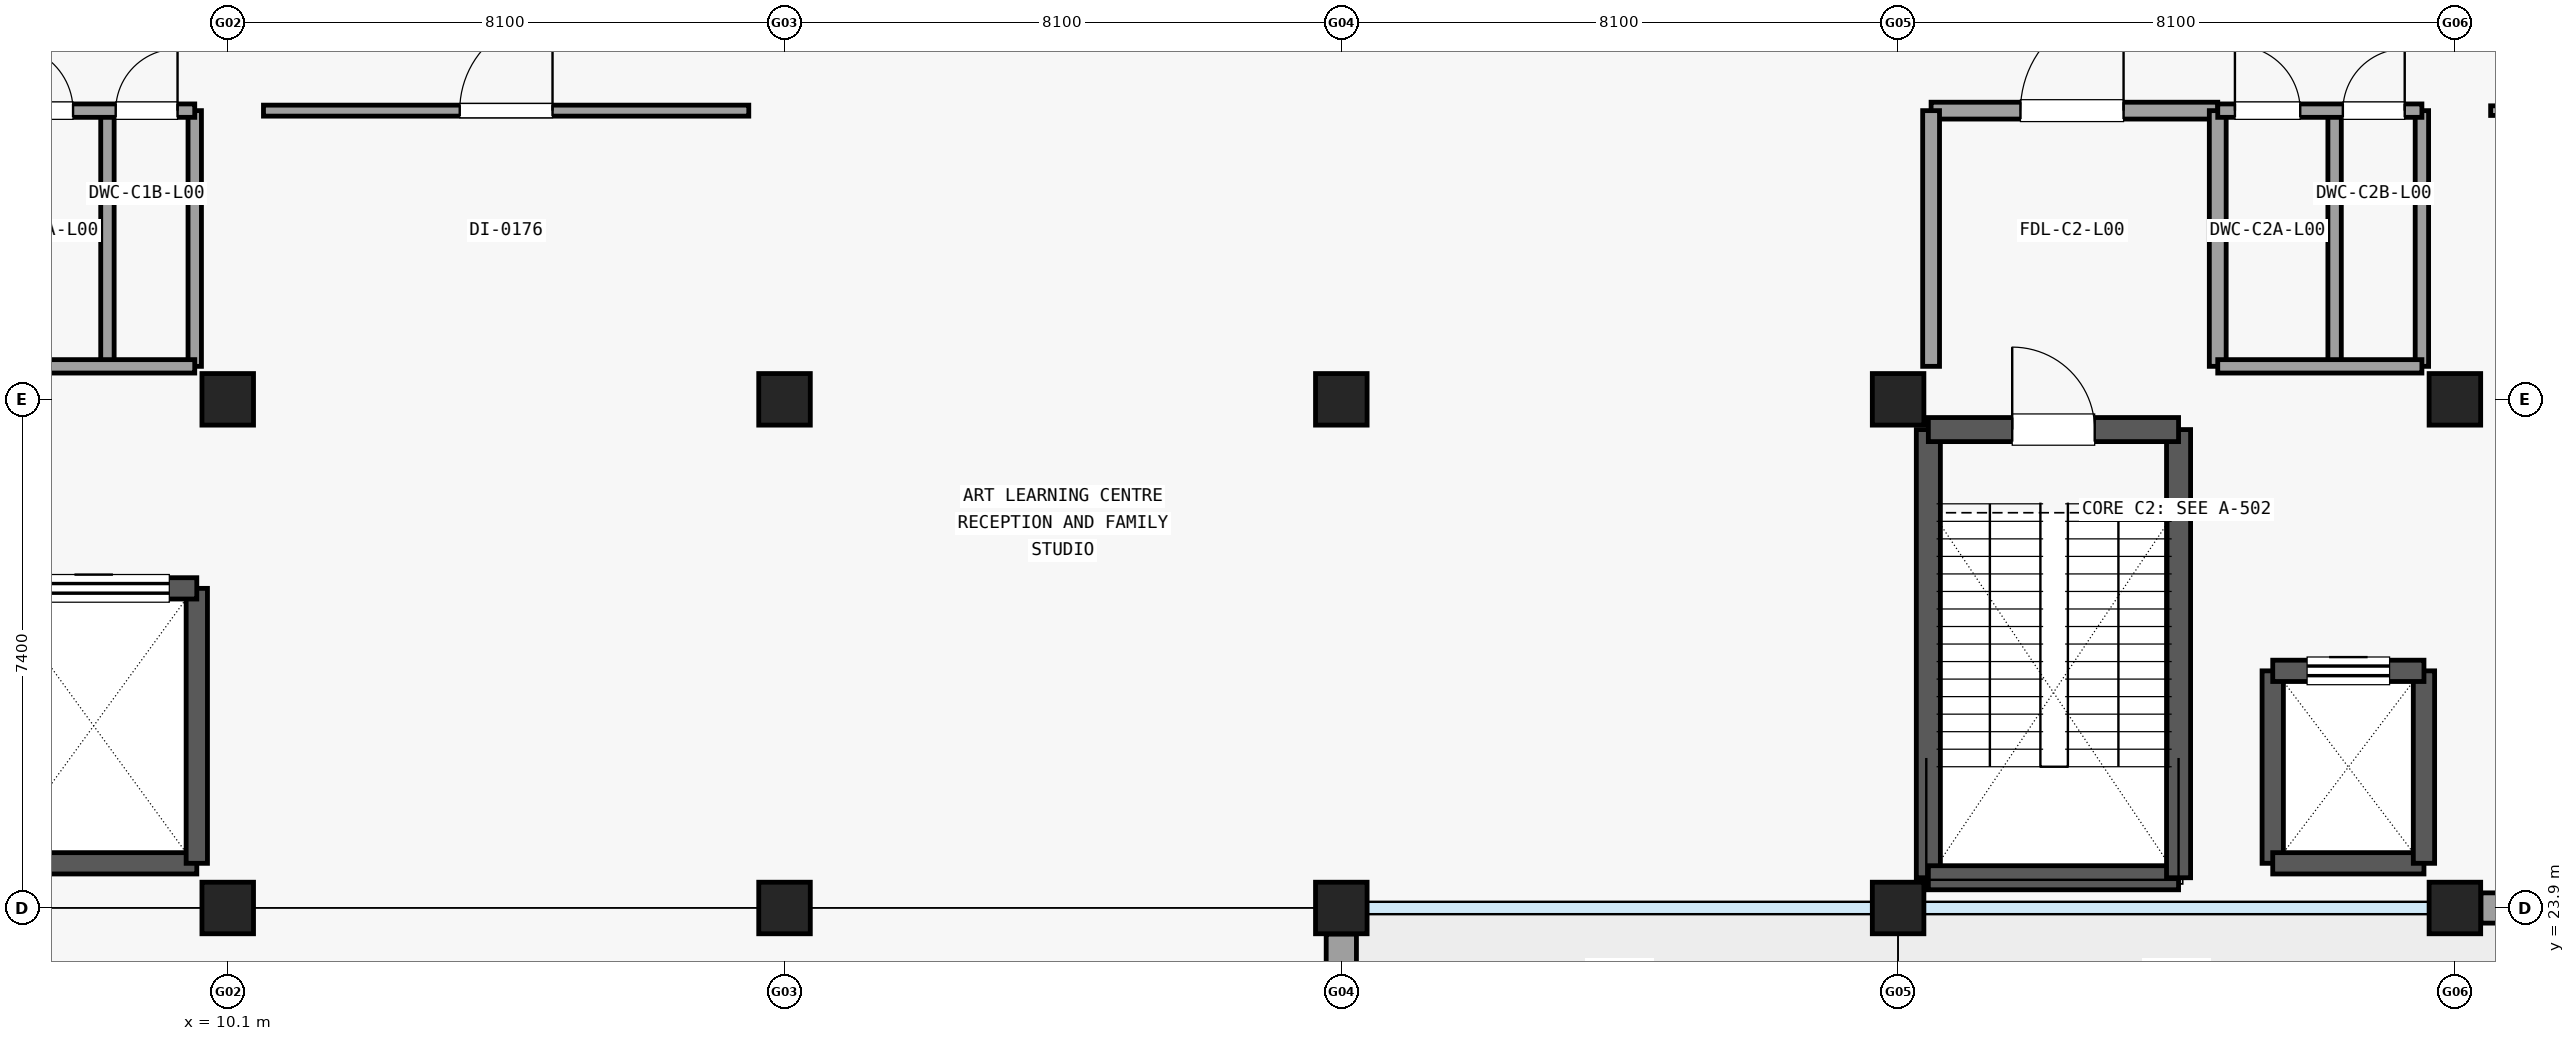
"""IFC4 building model, lengths in metres.
Left out: names, types, materials, properties, quantities, classifications, styles, units other than length and angle.
Written with IfcOpenShell. Run it as: python <this file> out.ifc"""

import sys

from ifc_helpers import new_model, si_unit, direction, frame, frame_2d, origin, origin_2d, place, context, subcontext, project, spatial, rectangle, extrude, element, fill, save


model = new_model("IFC4")
c1 = context("Model", 3, precision=1e-05, world=origin(), true_north=direction((0.0, 1.0)))
c2 = subcontext(c1, "Body", "Model", "MODEL_VIEW")
j1 = project(units=[si_unit("LENGTHUNIT", "METRE"), si_unit("PLANEANGLEUNIT", "RADIAN")], contexts=[c1])
p1 = place(None, origin())
s1 = spatial("IfcSite", under=j1, at=p1, CompositionType="ELEMENT")
p2 = place(p1, origin())
s2 = spatial("IfcBuilding", under=s1, at=p2, CompositionType="ELEMENT")
p3 = place(p2, origin())
s3 = spatial("IfcBuildingStorey", under=s2, at=p3, CompositionType="ELEMENT", Elevation=0.0)
for number, where, z_axis, x_axis in (
    (1, (10.1, 23.9, 0.0), (0.0, 0.0, 1.0), (1.0, 0.0, 0.0)),
    (2, (10.1, 31.3, 0.0), (0.0, 0.0, 1.0), (1.0, 0.0, 0.0)),
    (3, (18.2, 23.9, 0.0), (0.0, 0.0, 1.0), (1.0, 0.0, 0.0)),
    (4, (18.2, 31.3, 0.0), (0.0, 0.0, 1.0), (1.0, 0.0, 0.0)),
    (5, (26.3, 23.9, 0.0), (0.0, 0.0, 1.0), (1.0, 0.0, 0.0)),
    (6, (26.3, 31.3, 0.0), (0.0, 0.0, 1.0), (1.0, 0.0, 0.0)),
    (7, (34.4, 23.9, 0.0), (0.0, 0.0, 1.0), (1.0, 0.0, 0.0)),
    (8, (34.4, 31.3, 0.0), (0.0, 0.0, 1.0), (1.0, 0.0, 0.0)),
    (9, (42.5, 23.9, 0.0), (0.0, 0.0, 1.0), (1.0, 0.0, 0.0)),
    (10, (42.5, 31.3, 0.0), (0.0, 0.0, 1.0), (1.0, 0.0, 0.0)),
):
    element("IfcColumn", number, at=place(p3, frame(where, z_axis=z_axis, x_axis=x_axis)), inside=s3, PredefinedType="COLUMN", context=c2, shape_type="SweptSolid", body=[
        extrude(rectangle(XDim=0.75, YDim=0.75, at=origin_2d()), origin(), (0.0, 0.0, 1.0), 5.135),
    ])
p4 = place(p3, frame((26.3, 23.521, 0.0), z_axis=(0.0, 0.0, 1.0), x_axis=(0.0, -1.0, 0.0)))
e11 = element("IfcWall", 11, at=p4, inside=s3, PredefinedType="SOLIDWALL", context=c2, shape_type="SweptSolid", body=[
    extrude(rectangle(XDim=6.642, YDim=0.44, at=frame_2d((3.321, 0.0))), origin(), (0.0, 0.0, 1.0), 4.27),
])
p5 = place(p4, frame((2.331, 0.0, 0.65)))
e12 = element("IfcOpeningElement", 12, at=p5, cuts=e11, PredefinedType="OPENING", context=c2, shape_type="SweptSolid", body=[
    extrude(rectangle(XDim=0.75, YDim=3.1, at=frame_2d((0.375, 1.55))), frame((0.0, 0.23, 0.0), z_axis=(0.0, -1.0, 0.0), x_axis=(1.0, 0.0, 0.0)), (0.0, 0.0, 1.0), 0.46),
])
p6 = place(p4, frame((3.561, 0.0, 0.65)))
e13 = element("IfcOpeningElement", 13, at=p6, cuts=e11, PredefinedType="OPENING", context=c2, shape_type="SweptSolid", body=[
    extrude(rectangle(XDim=0.75, YDim=3.1, at=frame_2d((0.375, 1.55))), frame((0.0, 0.23, 0.0), z_axis=(0.0, -1.0, 0.0), x_axis=(1.0, 0.0, 0.0)), (0.0, 0.0, 1.0), 0.46),
])
p7 = place(p3, frame((50.221, 23.9, 0.0), z_axis=(0.0, 0.0, 1.0), x_axis=(-1.0, 0.0, 0.0)))
e14 = element("IfcWall", 14, at=p7, inside=s3, PredefinedType="SOLIDWALL", context=c2, shape_type="SweptSolid", body=[
    extrude(rectangle(XDim=7.342, YDim=0.44, at=frame_2d((3.671, 0.0))), origin(), (0.0, 0.0, 1.0), 4.27),
])
p8 = place(p7, frame((2.646, 0.0, 0.0)))
e15 = element("IfcOpeningElement", 15, at=p8, cuts=e14, PredefinedType="OPENING", context=c2, shape_type="SweptSolid", body=[
    extrude(rectangle(XDim=2.05, YDim=2.35, at=frame_2d((1.025, 1.175))), frame((0.0, 0.23, 0.0), z_axis=(0.0, -1.0, 0.0), x_axis=(1.0, 0.0, 0.0)), (0.0, 0.0, 1.0), 0.46),
])
p9 = place(p3, frame((6.65, 24.55, 0.0), z_axis=(0.0, 0.0, 1.0), x_axis=(1.0, 0.0, 0.0)))
e16 = element("IfcWall", 16, at=p9, inside=s3, PredefinedType="SHEAR", context=c2, shape_type="SweptSolid", body=[
    extrude(rectangle(XDim=3.0, YDim=0.31, at=frame_2d((1.5, 0.0))), origin(), (0.0, 0.0, 1.0), 5.13),
])
p10 = place(p3, frame((9.65, 24.55, 0.0), z_axis=(0.0, 0.0, 1.0), x_axis=(0.0, 1.0, 0.0)))
e17 = element("IfcWall", 17, at=p10, inside=s3, PredefinedType="SHEAR", context=c2, shape_type="SweptSolid", body=[
    extrude(rectangle(XDim=4.0, YDim=0.31, at=frame_2d((2.0, 0.0))), origin(), (0.0, 0.0, 1.0), 5.13),
])
p11 = place(p3, frame((6.65, 28.55, 0.0), z_axis=(0.0, 0.0, 1.0), x_axis=(1.0, 0.0, 0.0)))
e18 = element("IfcWall", 18, at=p11, inside=s3, PredefinedType="SHEAR", context=c2, shape_type="SweptSolid", body=[
    extrude(rectangle(XDim=3.0, YDim=0.31, at=frame_2d((1.5, 0.0))), origin(), (0.0, 0.0, 1.0), 5.13),
])
p12 = place(p11, frame((0.4, 0.0, 0.0)))
e19 = element("IfcOpeningElement", 19, at=p12, cuts=e18, PredefinedType="OPENING", context=c2, shape_type="SweptSolid", body=[
    extrude(rectangle(XDim=2.2, YDim=2.55, at=frame_2d((1.1, 1.275))), frame((0.0, 0.165, 0.0), z_axis=(0.0, -1.0, 0.0), x_axis=(1.0, 0.0, 0.0)), (0.0, 0.0, 1.0), 0.33),
])
for number, where, z_axis, x_axis in (
    (20, (8.35, 31.78, 0.0), (0.0, 0.0, 1.0), (0.0, 1.0, 0.0)),
    (21, (9.62, 31.78, 0.0), (0.0, 0.0, 1.0), (0.0, 1.0, 0.0)),
):
    element("IfcWall", number, at=place(p3, frame(where, z_axis=z_axis, x_axis=x_axis)), inside=s3, PredefinedType="PARTITIONING", context=c2, shape_type="SweptSolid", body=[
        extrude(rectangle(XDim=3.72, YDim=0.195, at=frame_2d((1.86, 0.0))), origin(), (0.0, 0.0, 1.0), 4.275),
    ])
p13 = place(p3, frame((6.65, 31.78, 0.0), z_axis=(0.0, 0.0, 1.0), x_axis=(1.0, 0.0, 0.0)))
e22 = element("IfcWall", 22, at=p13, inside=s3, PredefinedType="PARTITIONING", context=c2, shape_type="SweptSolid", body=[
    extrude(rectangle(XDim=2.97, YDim=0.195, at=frame_2d((1.485, 0.0))), origin(), (0.0, 0.0, 1.0), 4.275),
])
p14 = place(p3, frame((6.65, 35.5, 0.0), z_axis=(0.0, 0.0, 1.0), x_axis=(1.0, 0.0, 0.0)))
e23 = element("IfcWall", 23, at=p14, inside=s3, PredefinedType="PARTITIONING", context=c2, shape_type="SweptSolid", body=[
    extrude(rectangle(XDim=2.97, YDim=0.195, at=frame_2d((1.485, 0.0))), origin(), (0.0, 0.0, 1.0), 4.275),
])
p15 = place(p14, frame((0.25, 0.0, 0.0)))
e24 = element("IfcOpeningElement", 24, at=p15, cuts=e23, PredefinedType="OPENING", context=c2, shape_type="SweptSolid", body=[
    extrude(rectangle(XDim=0.95, YDim=2.1, at=frame_2d((0.475, 1.05))), frame((0.0, 0.107, 0.0), z_axis=(0.0, -1.0, 0.0), x_axis=(1.0, 0.0, 0.0)), (0.0, 0.0, 1.0), 0.215),
])
p16 = place(p14, frame((1.82, 0.0, 0.0)))
e25 = element("IfcOpeningElement", 25, at=p16, cuts=e23, PredefinedType="OPENING", context=c2, shape_type="SweptSolid", body=[
    extrude(rectangle(XDim=0.9, YDim=2.1, at=frame_2d((0.45, 1.05))), frame((0.0, 0.107, 0.0), z_axis=(0.0, -1.0, 0.0), x_axis=(1.0, 0.0, 0.0)), (0.0, 0.0, 1.0), 0.215),
])
p17 = place(p3, frame((34.84, 24.34, 0.0), z_axis=(0.0, 0.0, 1.0), x_axis=(0.0, 1.0, 0.0)))
e26 = element("IfcWall", 26, at=p17, inside=s3, PredefinedType="SHEAR", context=c2, shape_type="SweptSolid", body=[
    extrude(rectangle(XDim=6.52, YDim=0.35, at=frame_2d((3.26, 0.0))), origin(), (0.0, 0.0, 1.0), 5.13),
])
p18 = place(p3, frame((34.84, 24.34, 0.0), z_axis=(0.0, 0.0, 1.0), x_axis=(1.0, 0.0, 0.0)))
e27 = element("IfcWall", 27, at=p18, inside=s3, PredefinedType="SHEAR", context=c2, shape_type="SweptSolid", body=[
    extrude(rectangle(XDim=3.64, YDim=0.35, at=frame_2d((1.82, 0.0))), origin(), (0.0, 0.0, 1.0), 5.13),
])
p19 = place(p3, frame((38.48, 24.34, 0.0), z_axis=(0.0, 0.0, 1.0), x_axis=(0.0, 1.0, 0.0)))
e28 = element("IfcWall", 28, at=p19, inside=s3, PredefinedType="SHEAR", context=c2, shape_type="SweptSolid", body=[
    extrude(rectangle(XDim=6.52, YDim=0.35, at=frame_2d((3.26, 0.0))), origin(), (0.0, 0.0, 1.0), 5.13),
])
p20 = place(p3, frame((34.84, 30.86, 0.0), z_axis=(0.0, 0.0, 1.0), x_axis=(1.0, 0.0, 0.0)))
e29 = element("IfcWall", 29, at=p20, inside=s3, PredefinedType="SHEAR", context=c2, shape_type="SweptSolid", body=[
    extrude(rectangle(XDim=3.64, YDim=0.35, at=frame_2d((1.82, 0.0))), origin(), (0.0, 0.0, 1.0), 5.13),
])
p21 = place(p20, frame((1.22, 0.0, 0.0)))
e30 = element("IfcOpeningElement", 30, at=p21, cuts=e29, PredefinedType="OPENING", context=c2, shape_type="SweptSolid", body=[
    extrude(rectangle(XDim=1.2, YDim=2.15, at=frame_2d((0.6, 1.075))), frame((0.0, 0.185, 0.0), z_axis=(0.0, -1.0, 0.0), x_axis=(1.0, 0.0, 0.0)), (0.0, 0.0, 1.0), 0.37),
])
p22 = place(p3, frame((39.85, 24.55, 0.0), z_axis=(0.0, 0.0, 1.0), x_axis=(0.0, 1.0, 0.0)))
e31 = element("IfcWall", 31, at=p22, inside=s3, PredefinedType="SHEAR", context=c2, shape_type="SweptSolid", body=[
    extrude(rectangle(XDim=2.8, YDim=0.31, at=frame_2d((1.4, 0.0))), origin(), (0.0, 0.0, 1.0), 5.13),
])
p23 = place(p3, frame((39.85, 24.55, 0.0), z_axis=(0.0, 0.0, 1.0), x_axis=(1.0, 0.0, 0.0)))
e32 = element("IfcWall", 32, at=p23, inside=s3, PredefinedType="SHEAR", context=c2, shape_type="SweptSolid", body=[
    extrude(rectangle(XDim=2.2, YDim=0.31, at=frame_2d((1.1, 0.0))), origin(), (0.0, 0.0, 1.0), 5.13),
])
p24 = place(p3, frame((42.05, 24.55, 0.0), z_axis=(0.0, 0.0, 1.0), x_axis=(0.0, 1.0, 0.0)))
e33 = element("IfcWall", 33, at=p24, inside=s3, PredefinedType="SHEAR", context=c2, shape_type="SweptSolid", body=[
    extrude(rectangle(XDim=2.8, YDim=0.31, at=frame_2d((1.4, 0.0))), origin(), (0.0, 0.0, 1.0), 5.13),
])
p25 = place(p3, frame((39.85, 27.35, 0.0), z_axis=(0.0, 0.0, 1.0), x_axis=(1.0, 0.0, 0.0)))
e34 = element("IfcWall", 34, at=p25, inside=s3, PredefinedType="SHEAR", context=c2, shape_type="SweptSolid", body=[
    extrude(rectangle(XDim=2.2, YDim=0.31, at=frame_2d((1.1, 0.0))), origin(), (0.0, 0.0, 1.0), 5.13),
])
p26 = place(p25, frame((0.5, 0.0, 0.0)))
e35 = element("IfcOpeningElement", 35, at=p26, cuts=e34, PredefinedType="OPENING", context=c2, shape_type="SweptSolid", body=[
    extrude(rectangle(XDim=1.2, YDim=2.15, at=frame_2d((0.6, 1.075))), frame((0.0, 0.165, 0.0), z_axis=(0.0, -1.0, 0.0), x_axis=(1.0, 0.0, 0.0)), (0.0, 0.0, 1.0), 0.33),
])
p27 = place(p3, frame((34.88, 35.5, 0.0), z_axis=(0.0, 0.0, 1.0), x_axis=(1.0, 0.0, 0.0)))
e36 = element("IfcWall", 36, at=p27, inside=s3, PredefinedType="PARTITIONING", context=c2, shape_type="SweptSolid", body=[
    extrude(rectangle(XDim=4.17, YDim=0.245, at=frame_2d((2.085, 0.0))), origin(), (0.0, 0.0, 1.0), 4.275),
])
p28 = place(p27, frame((1.3, 0.0, 0.0)))
e37 = element("IfcOpeningElement", 37, at=p28, cuts=e36, PredefinedType="OPENING", context=c2, shape_type="SweptSolid", body=[
    extrude(rectangle(XDim=1.5, YDim=2.15, at=frame_2d((0.75, 1.075))), frame((0.0, 0.133, 0.0), z_axis=(0.0, -1.0, 0.0), x_axis=(1.0, 0.0, 0.0)), (0.0, 0.0, 1.0), 0.265),
])
for number, where, z_axis, x_axis in (
    (38, (34.88, 31.78, 0.0), (0.0, 0.0, 1.0), (0.0, 1.0, 0.0)),
    (39, (39.05, 31.78, 0.0), (0.0, 0.0, 1.0), (0.0, 1.0, 0.0)),
):
    element("IfcWall", number, at=place(p3, frame(where, z_axis=z_axis, x_axis=x_axis)), inside=s3, PredefinedType="PARTITIONING", context=c2, shape_type="SweptSolid", body=[
        extrude(rectangle(XDim=3.72, YDim=0.245, at=frame_2d((1.86, 0.0))), origin(), (0.0, 0.0, 1.0), 4.275),
    ])
for number, where, z_axis, x_axis in (
    (40, (40.75, 31.78, 0.0), (0.0, 0.0, 1.0), (0.0, 1.0, 0.0)),
    (41, (42.02, 31.78, 0.0), (0.0, 0.0, 1.0), (0.0, 1.0, 0.0)),
):
    element("IfcWall", number, at=place(p3, frame(where, z_axis=z_axis, x_axis=x_axis)), inside=s3, PredefinedType="PARTITIONING", context=c2, shape_type="SweptSolid", body=[
        extrude(rectangle(XDim=3.72, YDim=0.195, at=frame_2d((1.86, 0.0))), origin(), (0.0, 0.0, 1.0), 4.275),
    ])
p29 = place(p3, frame((39.05, 31.78, 0.0), z_axis=(0.0, 0.0, 1.0), x_axis=(1.0, 0.0, 0.0)))
e42 = element("IfcWall", 42, at=p29, inside=s3, PredefinedType="PARTITIONING", context=c2, shape_type="SweptSolid", body=[
    extrude(rectangle(XDim=2.97, YDim=0.195, at=frame_2d((1.485, 0.0))), origin(), (0.0, 0.0, 1.0), 4.275),
])
p30 = place(p3, frame((39.05, 35.5, 0.0), z_axis=(0.0, 0.0, 1.0), x_axis=(1.0, 0.0, 0.0)))
e43 = element("IfcWall", 43, at=p30, inside=s3, PredefinedType="PARTITIONING", context=c2, shape_type="SweptSolid", body=[
    extrude(rectangle(XDim=2.97, YDim=0.195, at=frame_2d((1.485, 0.0))), origin(), (0.0, 0.0, 1.0), 4.275),
])
p31 = place(p30, frame((0.25, 0.0, 0.0)))
e44 = element("IfcOpeningElement", 44, at=p31, cuts=e43, PredefinedType="OPENING", context=c2, shape_type="SweptSolid", body=[
    extrude(rectangle(XDim=0.95, YDim=2.1, at=frame_2d((0.475, 1.05))), frame((0.0, 0.107, 0.0), z_axis=(0.0, -1.0, 0.0), x_axis=(1.0, 0.0, 0.0)), (0.0, 0.0, 1.0), 0.215),
])
p32 = place(p30, frame((1.82, 0.0, 0.0)))
e45 = element("IfcOpeningElement", 45, at=p32, cuts=e43, PredefinedType="OPENING", context=c2, shape_type="SweptSolid", body=[
    extrude(rectangle(XDim=0.9, YDim=2.1, at=frame_2d((0.45, 1.05))), frame((0.0, 0.107, 0.0), z_axis=(0.0, -1.0, 0.0), x_axis=(1.0, 0.0, 0.0)), (0.0, 0.0, 1.0), 0.215),
])
p33 = place(p3, frame((10.62, 35.5, 0.0), z_axis=(0.0, 0.0, 1.0), x_axis=(1.0, 0.0, 0.0)))
e46 = element("IfcWall", 46, at=p33, inside=s3, PredefinedType="PARTITIONING", context=c2, shape_type="SweptSolid", body=[
    extrude(rectangle(XDim=7.06, YDim=0.16, at=frame_2d((3.53, 0.0))), origin(), (0.0, 0.0, 1.0), 4.275),
])
p34 = place(p33, frame((2.855, 0.0, 0.0)))
e47 = element("IfcOpeningElement", 47, at=p34, cuts=e46, PredefinedType="OPENING", context=c2, shape_type="SweptSolid", body=[
    extrude(rectangle(XDim=1.35, YDim=2.2, at=frame_2d((0.675, 1.1))), frame((0.0, 0.09, 0.0), z_axis=(0.0, -1.0, 0.0), x_axis=(1.0, 0.0, 0.0)), (0.0, 0.0, 1.0), 0.18),
])
p35 = place(p3, frame((43.02, 35.5, 0.0), z_axis=(0.0, 0.0, 1.0), x_axis=(1.0, 0.0, 0.0)))
e48 = element("IfcWall", 48, at=p35, inside=s3, PredefinedType="PARTITIONING", context=c2, shape_type="SweptSolid", body=[
    extrude(rectangle(XDim=7.06, YDim=0.14, at=frame_2d((3.53, 0.0))), origin(), (0.0, 0.0, 1.0), 4.275),
])
p36 = place(p35, frame((3.03, 0.0, 0.0)))
e49 = element("IfcOpeningElement", 49, at=p36, cuts=e48, PredefinedType="OPENING", context=c2, shape_type="SweptSolid", body=[
    extrude(rectangle(XDim=1.0, YDim=2.12, at=frame_2d((0.5, 1.06))), frame((0.0, 0.08, 0.0), z_axis=(0.0, -1.0, 0.0), x_axis=(1.0, 0.0, 0.0)), (0.0, 0.0, 1.0), 0.16),
])
p37 = place(p12, origin())
e50 = element("IfcDoor", 50, at=p37, inside=s3, OperationType="SLIDING_TO_RIGHT", PredefinedType="DOOR", context=c2, shape_type="SweptSolid", body=[
    extrude(rectangle(XDim=2.2, YDim=2.55, at=frame_2d((1.1, 1.275))), frame((0.0, 0.025, 0.0), z_axis=(0.0, -1.0, 0.0), x_axis=(1.0, 0.0, 0.0)), (0.0, 0.0, 1.0), 0.05),
])
fill(e19, e50)
p38 = place(p15, origin())
e51 = element("IfcDoor", 51, at=p38, inside=s3, OperationType="SINGLE_SWING_LEFT", PredefinedType="DOOR", context=c2, shape_type="SweptSolid", body=[
    extrude(rectangle(XDim=0.95, YDim=2.1, at=frame_2d((0.475, 1.05))), frame((0.0, 0.025, 0.0), z_axis=(0.0, -1.0, 0.0), x_axis=(1.0, 0.0, 0.0)), (0.0, 0.0, 1.0), 0.05),
])
fill(e24, e51)
p39 = place(p16, origin())
e52 = element("IfcDoor", 52, at=p39, inside=s3, OperationType="SINGLE_SWING_RIGHT", PredefinedType="DOOR", context=c2, shape_type="SweptSolid", body=[
    extrude(rectangle(XDim=0.9, YDim=2.1, at=frame_2d((0.45, 1.05))), frame((0.0, 0.025, 0.0), z_axis=(0.0, -1.0, 0.0), x_axis=(1.0, 0.0, 0.0)), (0.0, 0.0, 1.0), 0.05),
])
fill(e25, e52)
p40 = place(p21, origin())
e53 = element("IfcDoor", 53, at=p40, inside=s3, OperationType="SINGLE_SWING_LEFT", PredefinedType="DOOR", context=c2, shape_type="SweptSolid", body=[
    extrude(rectangle(XDim=1.2, YDim=2.15, at=frame_2d((0.6, 1.075))), frame((0.0, 0.025, 0.0), z_axis=(0.0, -1.0, 0.0), x_axis=(1.0, 0.0, 0.0)), (0.0, 0.0, 1.0), 0.05),
])
fill(e30, e53)
p41 = place(p26, origin())
e54 = element("IfcDoor", 54, at=p41, inside=s3, OperationType="SLIDING_TO_RIGHT", PredefinedType="DOOR", context=c2, shape_type="SweptSolid", body=[
    extrude(rectangle(XDim=1.2, YDim=2.15, at=frame_2d((0.6, 1.075))), frame((0.0, 0.025, 0.0), z_axis=(0.0, -1.0, 0.0), x_axis=(1.0, 0.0, 0.0)), (0.0, 0.0, 1.0), 0.05),
])
fill(e35, e54)
p42 = place(p28, origin())
e55 = element("IfcDoor", 55, at=p42, inside=s3, OperationType="SINGLE_SWING_RIGHT", PredefinedType="DOOR", context=c2, shape_type="SweptSolid", body=[
    extrude(rectangle(XDim=1.5, YDim=2.15, at=frame_2d((0.75, 1.075))), frame((0.0, 0.025, 0.0), z_axis=(0.0, -1.0, 0.0), x_axis=(1.0, 0.0, 0.0)), (0.0, 0.0, 1.0), 0.05),
])
fill(e37, e55)
p43 = place(p31, origin())
e56 = element("IfcDoor", 56, at=p43, inside=s3, OperationType="SINGLE_SWING_LEFT", PredefinedType="DOOR", context=c2, shape_type="SweptSolid", body=[
    extrude(rectangle(XDim=0.95, YDim=2.1, at=frame_2d((0.475, 1.05))), frame((0.0, 0.025, 0.0), z_axis=(0.0, -1.0, 0.0), x_axis=(1.0, 0.0, 0.0)), (0.0, 0.0, 1.0), 0.05),
])
fill(e44, e56)
p44 = place(p32, origin())
e57 = element("IfcDoor", 57, at=p44, inside=s3, OperationType="SINGLE_SWING_RIGHT", PredefinedType="DOOR", context=c2, shape_type="SweptSolid", body=[
    extrude(rectangle(XDim=0.9, YDim=2.1, at=frame_2d((0.45, 1.05))), frame((0.0, 0.025, 0.0), z_axis=(0.0, -1.0, 0.0), x_axis=(1.0, 0.0, 0.0)), (0.0, 0.0, 1.0), 0.05),
])
fill(e45, e57)
p45 = place(p34, origin())
e58 = element("IfcDoor", 58, at=p45, inside=s3, OperationType="SINGLE_SWING_RIGHT", PredefinedType="DOOR", context=c2, shape_type="SweptSolid", body=[
    extrude(rectangle(XDim=1.35, YDim=2.2, at=frame_2d((0.675, 1.1))), frame((0.0, 0.025, 0.0), z_axis=(0.0, -1.0, 0.0), x_axis=(1.0, 0.0, 0.0)), (0.0, 0.0, 1.0), 0.05),
])
fill(e47, e58)
save(model, sys.argv[1])
